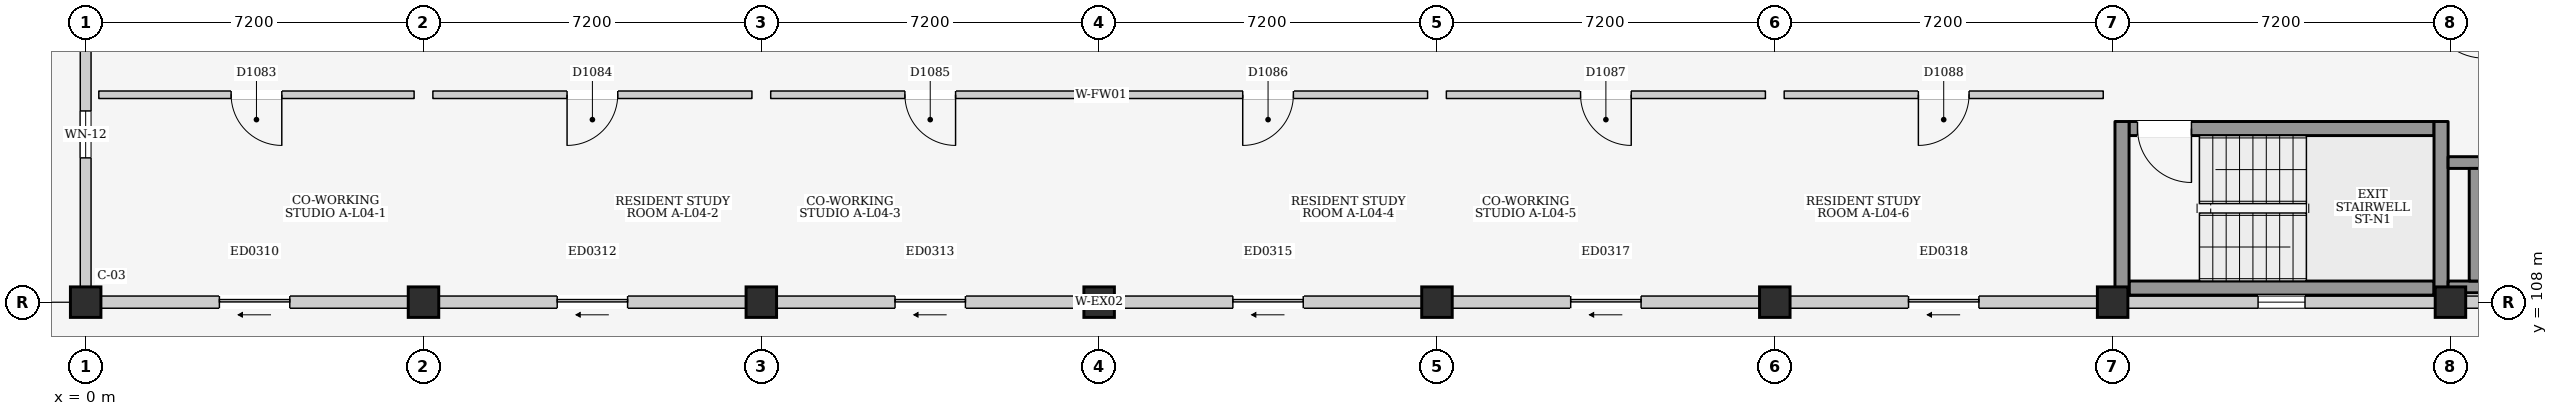
"""IFC4 building model, lengths in metres.
Left out: names, types, materials, properties, quantities, classifications, styles, units other than length and angle.
Written with IfcOpenShell. Run it as: python <this file> out.ifc"""

import sys

from ifc_helpers import new_model, si_unit, direction, frame, frame_2d, origin, origin_2d, place, context, subcontext, project, spatial, rectangle, extrude, element, fill, save


model = new_model("IFC4")
c1 = context("Model", 3, precision=1e-05, world=origin(), true_north=direction((0.0, 1.0)))
c2 = subcontext(c1, "Body", "Model", "MODEL_VIEW")
j1 = project(units=[si_unit("LENGTHUNIT", "METRE"), si_unit("PLANEANGLEUNIT", "RADIAN")], contexts=[c1])
p1 = place(None, origin())
s1 = spatial("IfcSite", under=j1, at=p1, CompositionType="ELEMENT")
p2 = place(p1, origin())
s2 = spatial("IfcBuilding", under=s1, at=p2, CompositionType="ELEMENT")
p3 = place(p2, frame((0.0, 0.0, 15.4)))
s3 = spatial("IfcBuildingStorey", under=s2, at=p3, CompositionType="ELEMENT", Elevation=15.4)
for number, where, z_axis, x_axis in (
    (1, (0.0, 108.0, 0.0), (0.0, 0.0, 1.0), (1.0, 0.0, 0.0)),
    (2, (7.2, 108.0, 0.0), (0.0, 0.0, 1.0), (1.0, 0.0, 0.0)),
    (3, (14.4, 108.0, 0.0), (0.0, 0.0, 1.0), (1.0, 0.0, 0.0)),
    (4, (21.6, 108.0, 0.0), (0.0, 0.0, 1.0), (1.0, 0.0, 0.0)),
    (5, (28.8, 108.0, 0.0), (0.0, 0.0, 1.0), (1.0, 0.0, 0.0)),
    (6, (36.0, 108.0, 0.0), (0.0, 0.0, 1.0), (1.0, 0.0, 0.0)),
    (7, (43.2, 108.0, 0.0), (0.0, 0.0, 1.0), (1.0, 0.0, 0.0)),
    (8, (50.4, 108.0, 0.0), (0.0, 0.0, 1.0), (1.0, 0.0, 0.0)),
):
    element("IfcColumn", number, at=place(p3, frame(where, z_axis=z_axis, x_axis=x_axis)), inside=s3, PredefinedType="COLUMN", context=c2, shape_type="SweptSolid", body=[
        extrude(rectangle(XDim=0.65, YDim=0.65, at=origin_2d()), origin(), (0.0, 0.0, 1.0), 3.2),
    ])
p4 = place(p3, frame((0.325, 108.0, 0.0), z_axis=(0.0, 0.0, 1.0), x_axis=(1.0, 0.0, 0.0)))
e9 = element("IfcWall", 9, at=p4, inside=s3, PredefinedType="ELEMENTEDWALL", context=c2, shape_type="SweptSolid", body=[
    extrude(rectangle(XDim=6.55, YDim=0.26, at=frame_2d((3.275, 0.0))), origin(), (0.0, 0.0, 1.0), 2.285),
])
p5 = place(p4, frame((2.525, 0.0, 0.0)))
e10 = element("IfcOpeningElement", 10, at=p5, cuts=e9, PredefinedType="OPENING", context=c2, shape_type="SweptSolid", body=[
    extrude(rectangle(XDim=1.5, YDim=2.12, at=frame_2d((0.75, 1.06))), frame((0.0, 0.145, 0.0), z_axis=(0.0, -1.0, 0.0), x_axis=(1.0, 0.0, 0.0)), (0.0, 0.0, 1.0), 0.29),
])
p6 = place(p3, frame((7.525, 108.0, 0.0), z_axis=(0.0, 0.0, 1.0), x_axis=(1.0, 0.0, 0.0)))
e11 = element("IfcWall", 11, at=p6, inside=s3, PredefinedType="ELEMENTEDWALL", context=c2, shape_type="SweptSolid", body=[
    extrude(rectangle(XDim=6.55, YDim=0.26, at=frame_2d((3.275, 0.0))), origin(), (0.0, 0.0, 1.0), 2.285),
])
p7 = place(p6, frame((2.525, 0.0, 0.0)))
e12 = element("IfcOpeningElement", 12, at=p7, cuts=e11, PredefinedType="OPENING", context=c2, shape_type="SweptSolid", body=[
    extrude(rectangle(XDim=1.5, YDim=2.12, at=frame_2d((0.75, 1.06))), frame((0.0, 0.145, 0.0), z_axis=(0.0, -1.0, 0.0), x_axis=(1.0, 0.0, 0.0)), (0.0, 0.0, 1.0), 0.29),
])
p8 = place(p3, frame((14.725, 108.0, 0.0), z_axis=(0.0, 0.0, 1.0), x_axis=(1.0, 0.0, 0.0)))
e13 = element("IfcWall", 13, at=p8, inside=s3, PredefinedType="ELEMENTEDWALL", context=c2, shape_type="SweptSolid", body=[
    extrude(rectangle(XDim=6.55, YDim=0.26, at=frame_2d((3.275, 0.0))), origin(), (0.0, 0.0, 1.0), 2.285),
])
p9 = place(p8, frame((2.525, 0.0, 0.0)))
e14 = element("IfcOpeningElement", 14, at=p9, cuts=e13, PredefinedType="OPENING", context=c2, shape_type="SweptSolid", body=[
    extrude(rectangle(XDim=1.5, YDim=2.12, at=frame_2d((0.75, 1.06))), frame((0.0, 0.145, 0.0), z_axis=(0.0, -1.0, 0.0), x_axis=(1.0, 0.0, 0.0)), (0.0, 0.0, 1.0), 0.29),
])
p10 = place(p3, frame((21.925, 108.0, 0.0), z_axis=(0.0, 0.0, 1.0), x_axis=(1.0, 0.0, 0.0)))
e15 = element("IfcWall", 15, at=p10, inside=s3, PredefinedType="ELEMENTEDWALL", context=c2, shape_type="SweptSolid", body=[
    extrude(rectangle(XDim=6.55, YDim=0.26, at=frame_2d((3.275, 0.0))), origin(), (0.0, 0.0, 1.0), 2.285),
])
p11 = place(p10, frame((2.525, 0.0, 0.0)))
e16 = element("IfcOpeningElement", 16, at=p11, cuts=e15, PredefinedType="OPENING", context=c2, shape_type="SweptSolid", body=[
    extrude(rectangle(XDim=1.5, YDim=2.12, at=frame_2d((0.75, 1.06))), frame((0.0, 0.145, 0.0), z_axis=(0.0, -1.0, 0.0), x_axis=(1.0, 0.0, 0.0)), (0.0, 0.0, 1.0), 0.29),
])
p12 = place(p3, frame((29.125, 108.0, 0.0), z_axis=(0.0, 0.0, 1.0), x_axis=(1.0, 0.0, 0.0)))
e17 = element("IfcWall", 17, at=p12, inside=s3, PredefinedType="ELEMENTEDWALL", context=c2, shape_type="SweptSolid", body=[
    extrude(rectangle(XDim=6.55, YDim=0.26, at=frame_2d((3.275, 0.0))), origin(), (0.0, 0.0, 1.0), 2.285),
])
p13 = place(p12, frame((2.525, 0.0, 0.0)))
e18 = element("IfcOpeningElement", 18, at=p13, cuts=e17, PredefinedType="OPENING", context=c2, shape_type="SweptSolid", body=[
    extrude(rectangle(XDim=1.5, YDim=2.12, at=frame_2d((0.75, 1.06))), frame((0.0, 0.145, 0.0), z_axis=(0.0, -1.0, 0.0), x_axis=(1.0, 0.0, 0.0)), (0.0, 0.0, 1.0), 0.29),
])
p14 = place(p3, frame((36.325, 108.0, 0.0), z_axis=(0.0, 0.0, 1.0), x_axis=(1.0, 0.0, 0.0)))
e19 = element("IfcWall", 19, at=p14, inside=s3, PredefinedType="ELEMENTEDWALL", context=c2, shape_type="SweptSolid", body=[
    extrude(rectangle(XDim=6.55, YDim=0.26, at=frame_2d((3.275, 0.0))), origin(), (0.0, 0.0, 1.0), 2.285),
])
p15 = place(p14, frame((2.525, 0.0, 0.0)))
e20 = element("IfcOpeningElement", 20, at=p15, cuts=e19, PredefinedType="OPENING", context=c2, shape_type="SweptSolid", body=[
    extrude(rectangle(XDim=1.5, YDim=2.12, at=frame_2d((0.75, 1.06))), frame((0.0, 0.145, 0.0), z_axis=(0.0, -1.0, 0.0), x_axis=(1.0, 0.0, 0.0)), (0.0, 0.0, 1.0), 0.29),
])
p16 = place(p3, frame((43.525, 108.0, 0.0), z_axis=(0.0, 0.0, 1.0), x_axis=(1.0, 0.0, 0.0)))
e21 = element("IfcWall", 21, at=p16, inside=s3, PredefinedType="ELEMENTEDWALL", context=c2, shape_type="SweptSolid", body=[
    extrude(rectangle(XDim=6.55, YDim=0.26, at=frame_2d((3.275, 0.0))), origin(), (0.0, 0.0, 1.0), 2.285),
])
p17 = place(p16, frame((2.775, 0.0, 1.2)))
e22 = element("IfcOpeningElement", 22, at=p17, cuts=e21, PredefinedType="OPENING", context=c2, shape_type="SweptSolid", body=[
    extrude(rectangle(XDim=1.0, YDim=0.9, at=frame_2d((0.5, 0.45))), frame((0.0, 0.145, 0.0), z_axis=(0.0, -1.0, 0.0), x_axis=(1.0, 0.0, 0.0)), (0.0, 0.0, 1.0), 0.29),
])
p18 = place(p3, frame((50.725, 108.0, 0.0), z_axis=(0.0, 0.0, 1.0), x_axis=(1.0, 0.0, 0.0)))
e23 = element("IfcWall", 23, at=p18, inside=s3, PredefinedType="ELEMENTEDWALL", context=c2, shape_type="SweptSolid", body=[
    extrude(rectangle(XDim=6.55, YDim=0.26, at=frame_2d((3.275, 0.0))), origin(), (0.0, 0.0, 1.0), 2.285),
])
p19 = place(p18, frame((2.775, 0.0, 1.2)))
e24 = element("IfcOpeningElement", 24, at=p19, cuts=e23, PredefinedType="OPENING", context=c2, shape_type="SweptSolid", body=[
    extrude(rectangle(XDim=1.0, YDim=0.9, at=frame_2d((0.5, 0.45))), frame((0.0, 0.145, 0.0), z_axis=(0.0, -1.0, 0.0), x_axis=(1.0, 0.0, 0.0)), (0.0, 0.0, 1.0), 0.29),
])
p20 = place(p3, frame((0.0, 108.325, 0.0), z_axis=(0.0, 0.0, 1.0), x_axis=(0.0, 1.0, 0.0)))
e25 = element("IfcWall", 25, at=p20, inside=s3, PredefinedType="ELEMENTEDWALL", context=c2, shape_type="SweptSolid", body=[
    extrude(rectangle(XDim=6.55, YDim=0.23, at=frame_2d((3.275, 0.0))), origin(), (0.0, 0.0, 1.0), 2.43),
])
p21 = place(p20, frame((2.75, 0.0, 1.1)))
e26 = element("IfcOpeningElement", 26, at=p21, cuts=e25, PredefinedType="OPENING", context=c2, shape_type="SweptSolid", body=[
    extrude(rectangle(XDim=1.0, YDim=0.9, at=frame_2d((0.5, 0.45))), frame((0.0, 0.13, 0.0), z_axis=(0.0, -1.0, 0.0), x_axis=(1.0, 0.0, 0.0)), (0.0, 0.0, 1.0), 0.26),
])
p22 = place(p3, frame((43.55, 108.3, 0.0), z_axis=(0.0, 0.0, 1.0), x_axis=(1.0, 0.0, 0.0)))
e27 = element("IfcWall", 27, at=p22, inside=s3, PredefinedType="SHEAR", context=c2, shape_type="SweptSolid", body=[
    extrude(rectangle(XDim=6.5, YDim=0.3, at=frame_2d((3.25, 0.0))), origin(), (0.0, 0.0, 1.0), 2.95),
])
p23 = place(p3, frame((43.55, 111.7, 0.0), z_axis=(0.0, 0.0, 1.0), x_axis=(1.0, 0.0, 0.0)))
e28 = element("IfcWall", 28, at=p23, inside=s3, PredefinedType="SHEAR", context=c2, shape_type="SweptSolid", body=[
    extrude(rectangle(XDim=6.5, YDim=0.3, at=frame_2d((3.25, 0.0))), origin(), (0.0, 0.0, 1.0), 2.95),
])
p24 = place(p23, frame((0.18, 0.0, 0.0)))
e29 = element("IfcOpeningElement", 29, at=p24, cuts=e28, PredefinedType="OPENING", context=c2, shape_type="SweptSolid", body=[
    extrude(rectangle(XDim=1.15, YDim=2.2, at=frame_2d((0.575, 1.1))), frame((0.0, 0.165, 0.0), z_axis=(0.0, -1.0, 0.0), x_axis=(1.0, 0.0, 0.0)), (0.0, 0.0, 1.0), 0.33),
])
for number, where, z_axis, x_axis in (
    (30, (43.4, 108.15, 0.0), (0.0, 0.0, 1.0), (0.0, 1.0, 0.0)),
    (31, (50.2, 108.15, 0.0), (0.0, 0.0, 1.0), (0.0, 1.0, 0.0)),
):
    element("IfcWall", number, at=place(p3, frame(where, z_axis=z_axis, x_axis=x_axis)), inside=s3, PredefinedType="SHEAR", context=c2, shape_type="SweptSolid", body=[
        extrude(rectangle(XDim=3.7, YDim=0.3, at=frame_2d((1.85, 0.0))), origin(), (0.0, 0.0, 1.0), 2.95),
    ])
p25 = place(p3, frame((50.35, 108.325, 0.0), z_axis=(0.0, 0.0, 1.0), x_axis=(1.0, 0.0, 0.0)))
e32 = element("IfcWall", 32, at=p25, inside=s3, PredefinedType="SHEAR", context=c2, shape_type="SweptSolid", body=[
    extrude(rectangle(XDim=2.675, YDim=0.25, at=frame_2d((1.337, 0.0))), origin(), (0.0, 0.0, 1.0), 2.95),
])
p26 = place(p3, frame((50.35, 110.975, 0.0), z_axis=(0.0, 0.0, 1.0), x_axis=(1.0, 0.0, 0.0)))
e33 = element("IfcWall", 33, at=p26, inside=s3, PredefinedType="SHEAR", context=c2, shape_type="SweptSolid", body=[
    extrude(rectangle(XDim=2.675, YDim=0.25, at=frame_2d((1.337, 0.0))), origin(), (0.0, 0.0, 1.0), 2.95),
])
p27 = place(p26, frame((1.0, 0.0, 0.0)))
e34 = element("IfcOpeningElement", 34, at=p27, cuts=e33, PredefinedType="OPENING", context=c2, shape_type="SweptSolid", body=[
    extrude(rectangle(XDim=1.2, YDim=2.25, at=frame_2d((0.6, 1.125))), frame((0.0, 0.14, 0.0), z_axis=(0.0, -1.0, 0.0), x_axis=(1.0, 0.0, 0.0)), (0.0, 0.0, 1.0), 0.28),
])
p28 = place(p3, frame((50.925, 108.45, 0.0), z_axis=(0.0, 0.0, 1.0), x_axis=(0.0, 1.0, 0.0)))
e35 = element("IfcWall", 35, at=p28, inside=s3, PredefinedType="SHEAR", context=c2, shape_type="SweptSolid", body=[
    extrude(rectangle(XDim=2.4, YDim=0.25, at=frame_2d((1.2, 0.0))), origin(), (0.0, 0.0, 1.0), 2.95),
])
p29 = place(p3, frame((0.28, 112.42, 0.0), z_axis=(0.0, 0.0, 1.0), x_axis=(1.0, 0.0, 0.0)))
e36 = element("IfcWall", 36, at=p29, inside=s3, PredefinedType="PARTITIONING", context=c2, shape_type="SweptSolid", body=[
    extrude(rectangle(XDim=6.72, YDim=0.16, at=frame_2d((3.36, 0.0))), origin(), (0.0, 0.0, 1.0), 2.95),
])
p30 = place(p29, frame((2.82, 0.0, 0.0)))
e37 = element("IfcOpeningElement", 37, at=p30, cuts=e36, PredefinedType="OPENING", context=c2, shape_type="SweptSolid", body=[
    extrude(rectangle(XDim=1.08, YDim=2.22, at=frame_2d((0.54, 1.11))), frame((0.0, 0.095, 0.0), z_axis=(0.0, -1.0, 0.0), x_axis=(1.0, 0.0, 0.0)), (0.0, 0.0, 1.0), 0.19),
])
p31 = place(p3, frame((7.4, 112.42, 0.0), z_axis=(0.0, 0.0, 1.0), x_axis=(1.0, 0.0, 0.0)))
e38 = element("IfcWall", 38, at=p31, inside=s3, PredefinedType="PARTITIONING", context=c2, shape_type="SweptSolid", body=[
    extrude(rectangle(XDim=6.8, YDim=0.16, at=frame_2d((3.4, 0.0))), origin(), (0.0, 0.0, 1.0), 2.95),
])
p32 = place(p31, frame((2.86, 0.0, 0.0)))
e39 = element("IfcOpeningElement", 39, at=p32, cuts=e38, PredefinedType="OPENING", context=c2, shape_type="SweptSolid", body=[
    extrude(rectangle(XDim=1.08, YDim=2.22, at=frame_2d((0.54, 1.11))), frame((0.0, 0.095, 0.0), z_axis=(0.0, -1.0, 0.0), x_axis=(1.0, 0.0, 0.0)), (0.0, 0.0, 1.0), 0.19),
])
p33 = place(p3, frame((14.6, 112.42, 0.0), z_axis=(0.0, 0.0, 1.0), x_axis=(1.0, 0.0, 0.0)))
e40 = element("IfcWall", 40, at=p33, inside=s3, PredefinedType="PARTITIONING", context=c2, shape_type="SweptSolid", body=[
    extrude(rectangle(XDim=6.8, YDim=0.16, at=frame_2d((3.4, 0.0))), origin(), (0.0, 0.0, 1.0), 2.95),
])
p34 = place(p33, frame((2.86, 0.0, 0.0)))
e41 = element("IfcOpeningElement", 41, at=p34, cuts=e40, PredefinedType="OPENING", context=c2, shape_type="SweptSolid", body=[
    extrude(rectangle(XDim=1.08, YDim=2.22, at=frame_2d((0.54, 1.11))), frame((0.0, 0.095, 0.0), z_axis=(0.0, -1.0, 0.0), x_axis=(1.0, 0.0, 0.0)), (0.0, 0.0, 1.0), 0.19),
])
p35 = place(p3, frame((21.8, 112.42, 0.0), z_axis=(0.0, 0.0, 1.0), x_axis=(1.0, 0.0, 0.0)))
e42 = element("IfcWall", 42, at=p35, inside=s3, PredefinedType="PARTITIONING", context=c2, shape_type="SweptSolid", body=[
    extrude(rectangle(XDim=6.8, YDim=0.16, at=frame_2d((3.4, 0.0))), origin(), (0.0, 0.0, 1.0), 2.95),
])
p36 = place(p35, frame((2.86, 0.0, 0.0)))
e43 = element("IfcOpeningElement", 43, at=p36, cuts=e42, PredefinedType="OPENING", context=c2, shape_type="SweptSolid", body=[
    extrude(rectangle(XDim=1.08, YDim=2.22, at=frame_2d((0.54, 1.11))), frame((0.0, 0.095, 0.0), z_axis=(0.0, -1.0, 0.0), x_axis=(1.0, 0.0, 0.0)), (0.0, 0.0, 1.0), 0.19),
])
p37 = place(p3, frame((29.0, 112.42, 0.0), z_axis=(0.0, 0.0, 1.0), x_axis=(1.0, 0.0, 0.0)))
e44 = element("IfcWall", 44, at=p37, inside=s3, PredefinedType="PARTITIONING", context=c2, shape_type="SweptSolid", body=[
    extrude(rectangle(XDim=6.8, YDim=0.16, at=frame_2d((3.4, 0.0))), origin(), (0.0, 0.0, 1.0), 2.95),
])
p38 = place(p37, frame((2.86, 0.0, 0.0)))
e45 = element("IfcOpeningElement", 45, at=p38, cuts=e44, PredefinedType="OPENING", context=c2, shape_type="SweptSolid", body=[
    extrude(rectangle(XDim=1.08, YDim=2.22, at=frame_2d((0.54, 1.11))), frame((0.0, 0.095, 0.0), z_axis=(0.0, -1.0, 0.0), x_axis=(1.0, 0.0, 0.0)), (0.0, 0.0, 1.0), 0.19),
])
p39 = place(p3, frame((36.2, 112.42, 0.0), z_axis=(0.0, 0.0, 1.0), x_axis=(1.0, 0.0, 0.0)))
e46 = element("IfcWall", 46, at=p39, inside=s3, PredefinedType="PARTITIONING", context=c2, shape_type="SweptSolid", body=[
    extrude(rectangle(XDim=6.8, YDim=0.16, at=frame_2d((3.4, 0.0))), origin(), (0.0, 0.0, 1.0), 2.95),
])
p40 = place(p39, frame((2.86, 0.0, 0.0)))
e47 = element("IfcOpeningElement", 47, at=p40, cuts=e46, PredefinedType="OPENING", context=c2, shape_type="SweptSolid", body=[
    extrude(rectangle(XDim=1.08, YDim=2.22, at=frame_2d((0.54, 1.11))), frame((0.0, 0.095, 0.0), z_axis=(0.0, -1.0, 0.0), x_axis=(1.0, 0.0, 0.0)), (0.0, 0.0, 1.0), 0.19),
])
p41 = place(p5, frame((1.5, 0.0, 0.0), z_axis=(0.0, 0.0, 1.0), x_axis=(-1.0, 0.0, 0.0)))
e48 = element("IfcDoor", 48, at=p41, inside=s3, OperationType="SLIDING_TO_LEFT", PredefinedType="DOOR", context=c2, shape_type="SweptSolid", body=[
    extrude(rectangle(XDim=1.5, YDim=2.12, at=frame_2d((0.75, 1.06))), frame((0.0, 0.025, 0.0), z_axis=(0.0, -1.0, 0.0), x_axis=(1.0, 0.0, 0.0)), (0.0, 0.0, 1.0), 0.05),
])
fill(e10, e48)
p42 = place(p7, frame((1.5, 0.0, 0.0), z_axis=(0.0, 0.0, 1.0), x_axis=(-1.0, 0.0, 0.0)))
e49 = element("IfcDoor", 49, at=p42, inside=s3, OperationType="SLIDING_TO_LEFT", PredefinedType="DOOR", context=c2, shape_type="SweptSolid", body=[
    extrude(rectangle(XDim=1.5, YDim=2.12, at=frame_2d((0.75, 1.06))), frame((0.0, 0.025, 0.0), z_axis=(0.0, -1.0, 0.0), x_axis=(1.0, 0.0, 0.0)), (0.0, 0.0, 1.0), 0.05),
])
fill(e12, e49)
p43 = place(p9, frame((1.5, 0.0, 0.0), z_axis=(0.0, 0.0, 1.0), x_axis=(-1.0, 0.0, 0.0)))
e50 = element("IfcDoor", 50, at=p43, inside=s3, OperationType="SLIDING_TO_LEFT", PredefinedType="DOOR", context=c2, shape_type="SweptSolid", body=[
    extrude(rectangle(XDim=1.5, YDim=2.12, at=frame_2d((0.75, 1.06))), frame((0.0, 0.025, 0.0), z_axis=(0.0, -1.0, 0.0), x_axis=(1.0, 0.0, 0.0)), (0.0, 0.0, 1.0), 0.05),
])
fill(e14, e50)
p44 = place(p11, frame((1.5, 0.0, 0.0), z_axis=(0.0, 0.0, 1.0), x_axis=(-1.0, 0.0, 0.0)))
e51 = element("IfcDoor", 51, at=p44, inside=s3, OperationType="SLIDING_TO_LEFT", PredefinedType="DOOR", context=c2, shape_type="SweptSolid", body=[
    extrude(rectangle(XDim=1.5, YDim=2.12, at=frame_2d((0.75, 1.06))), frame((0.0, 0.025, 0.0), z_axis=(0.0, -1.0, 0.0), x_axis=(1.0, 0.0, 0.0)), (0.0, 0.0, 1.0), 0.05),
])
fill(e16, e51)
p45 = place(p13, frame((1.5, 0.0, 0.0), z_axis=(0.0, 0.0, 1.0), x_axis=(-1.0, 0.0, 0.0)))
e52 = element("IfcDoor", 52, at=p45, inside=s3, OperationType="SLIDING_TO_LEFT", PredefinedType="DOOR", context=c2, shape_type="SweptSolid", body=[
    extrude(rectangle(XDim=1.5, YDim=2.12, at=frame_2d((0.75, 1.06))), frame((0.0, 0.025, 0.0), z_axis=(0.0, -1.0, 0.0), x_axis=(1.0, 0.0, 0.0)), (0.0, 0.0, 1.0), 0.05),
])
fill(e18, e52)
p46 = place(p15, frame((1.5, 0.0, 0.0), z_axis=(0.0, 0.0, 1.0), x_axis=(-1.0, 0.0, 0.0)))
e53 = element("IfcDoor", 53, at=p46, inside=s3, OperationType="SLIDING_TO_LEFT", PredefinedType="DOOR", context=c2, shape_type="SweptSolid", body=[
    extrude(rectangle(XDim=1.5, YDim=2.12, at=frame_2d((0.75, 1.06))), frame((0.0, 0.025, 0.0), z_axis=(0.0, -1.0, 0.0), x_axis=(1.0, 0.0, 0.0)), (0.0, 0.0, 1.0), 0.05),
])
fill(e20, e53)
p47 = place(p17, origin())
e54 = element("IfcWindow", 54, at=p47, inside=s3, PartitioningType="SINGLE_PANEL", PredefinedType="WINDOW", context=c2, shape_type="SweptSolid", body=[
    extrude(rectangle(XDim=1.0, YDim=0.9, at=frame_2d((0.5, 0.45))), frame((0.0, 0.03, 0.0), z_axis=(0.0, -1.0, 0.0), x_axis=(1.0, 0.0, 0.0)), (0.0, 0.0, 1.0), 0.06),
])
fill(e22, e54)
p48 = place(p21, origin())
e55 = element("IfcWindow", 55, at=p48, inside=s3, PartitioningType="SINGLE_PANEL", PredefinedType="WINDOW", context=c2, shape_type="SweptSolid", body=[
    extrude(rectangle(XDim=1.0, YDim=0.9, at=frame_2d((0.5, 0.45))), frame((0.0, 0.03, 0.0), z_axis=(0.0, -1.0, 0.0), x_axis=(1.0, 0.0, 0.0)), (0.0, 0.0, 1.0), 0.06),
])
fill(e26, e55)
p49 = place(p24, frame((1.15, 0.0, 0.0), z_axis=(0.0, 0.0, 1.0), x_axis=(-1.0, 0.0, 0.0)))
e56 = element("IfcDoor", 56, at=p49, inside=s3, OperationType="SINGLE_SWING_LEFT", PredefinedType="DOOR", context=c2, shape_type="SweptSolid", body=[
    extrude(rectangle(XDim=1.15, YDim=2.2, at=frame_2d((0.575, 1.1))), frame((0.0, 0.025, 0.0), z_axis=(0.0, -1.0, 0.0), x_axis=(1.0, 0.0, 0.0)), (0.0, 0.0, 1.0), 0.05),
])
fill(e29, e56)
p50 = place(p30, frame((1.08, 0.0, 0.0), z_axis=(0.0, 0.0, 1.0), x_axis=(-1.0, 0.0, 0.0)))
e57 = element("IfcDoor", 57, at=p50, inside=s3, OperationType="SINGLE_SWING_LEFT", PredefinedType="DOOR", context=c2, shape_type="SweptSolid", body=[
    extrude(rectangle(XDim=1.08, YDim=2.22, at=frame_2d((0.54, 1.11))), frame((0.0, 0.025, 0.0), z_axis=(0.0, -1.0, 0.0), x_axis=(1.0, 0.0, 0.0)), (0.0, 0.0, 1.0), 0.05),
])
fill(e37, e57)
p51 = place(p32, frame((1.08, 0.0, 0.0), z_axis=(0.0, 0.0, 1.0), x_axis=(-1.0, 0.0, 0.0)))
e58 = element("IfcDoor", 58, at=p51, inside=s3, OperationType="SINGLE_SWING_RIGHT", PredefinedType="DOOR", context=c2, shape_type="SweptSolid", body=[
    extrude(rectangle(XDim=1.08, YDim=2.22, at=frame_2d((0.54, 1.11))), frame((0.0, 0.025, 0.0), z_axis=(0.0, -1.0, 0.0), x_axis=(1.0, 0.0, 0.0)), (0.0, 0.0, 1.0), 0.05),
])
fill(e39, e58)
p52 = place(p34, frame((1.08, 0.0, 0.0), z_axis=(0.0, 0.0, 1.0), x_axis=(-1.0, 0.0, 0.0)))
e59 = element("IfcDoor", 59, at=p52, inside=s3, OperationType="SINGLE_SWING_LEFT", PredefinedType="DOOR", context=c2, shape_type="SweptSolid", body=[
    extrude(rectangle(XDim=1.08, YDim=2.22, at=frame_2d((0.54, 1.11))), frame((0.0, 0.025, 0.0), z_axis=(0.0, -1.0, 0.0), x_axis=(1.0, 0.0, 0.0)), (0.0, 0.0, 1.0), 0.05),
])
fill(e41, e59)
p53 = place(p36, frame((1.08, 0.0, 0.0), z_axis=(0.0, 0.0, 1.0), x_axis=(-1.0, 0.0, 0.0)))
e60 = element("IfcDoor", 60, at=p53, inside=s3, OperationType="SINGLE_SWING_RIGHT", PredefinedType="DOOR", context=c2, shape_type="SweptSolid", body=[
    extrude(rectangle(XDim=1.08, YDim=2.22, at=frame_2d((0.54, 1.11))), frame((0.0, 0.025, 0.0), z_axis=(0.0, -1.0, 0.0), x_axis=(1.0, 0.0, 0.0)), (0.0, 0.0, 1.0), 0.05),
])
fill(e43, e60)
p54 = place(p38, frame((1.08, 0.0, 0.0), z_axis=(0.0, 0.0, 1.0), x_axis=(-1.0, 0.0, 0.0)))
e61 = element("IfcDoor", 61, at=p54, inside=s3, OperationType="SINGLE_SWING_LEFT", PredefinedType="DOOR", context=c2, shape_type="SweptSolid", body=[
    extrude(rectangle(XDim=1.08, YDim=2.22, at=frame_2d((0.54, 1.11))), frame((0.0, 0.025, 0.0), z_axis=(0.0, -1.0, 0.0), x_axis=(1.0, 0.0, 0.0)), (0.0, 0.0, 1.0), 0.05),
])
fill(e45, e61)
p55 = place(p40, frame((1.08, 0.0, 0.0), z_axis=(0.0, 0.0, 1.0), x_axis=(-1.0, 0.0, 0.0)))
e62 = element("IfcDoor", 62, at=p55, inside=s3, OperationType="SINGLE_SWING_RIGHT", PredefinedType="DOOR", context=c2, shape_type="SweptSolid", body=[
    extrude(rectangle(XDim=1.08, YDim=2.22, at=frame_2d((0.54, 1.11))), frame((0.0, 0.025, 0.0), z_axis=(0.0, -1.0, 0.0), x_axis=(1.0, 0.0, 0.0)), (0.0, 0.0, 1.0), 0.05),
])
fill(e47, e62)
save(model, sys.argv[1])
